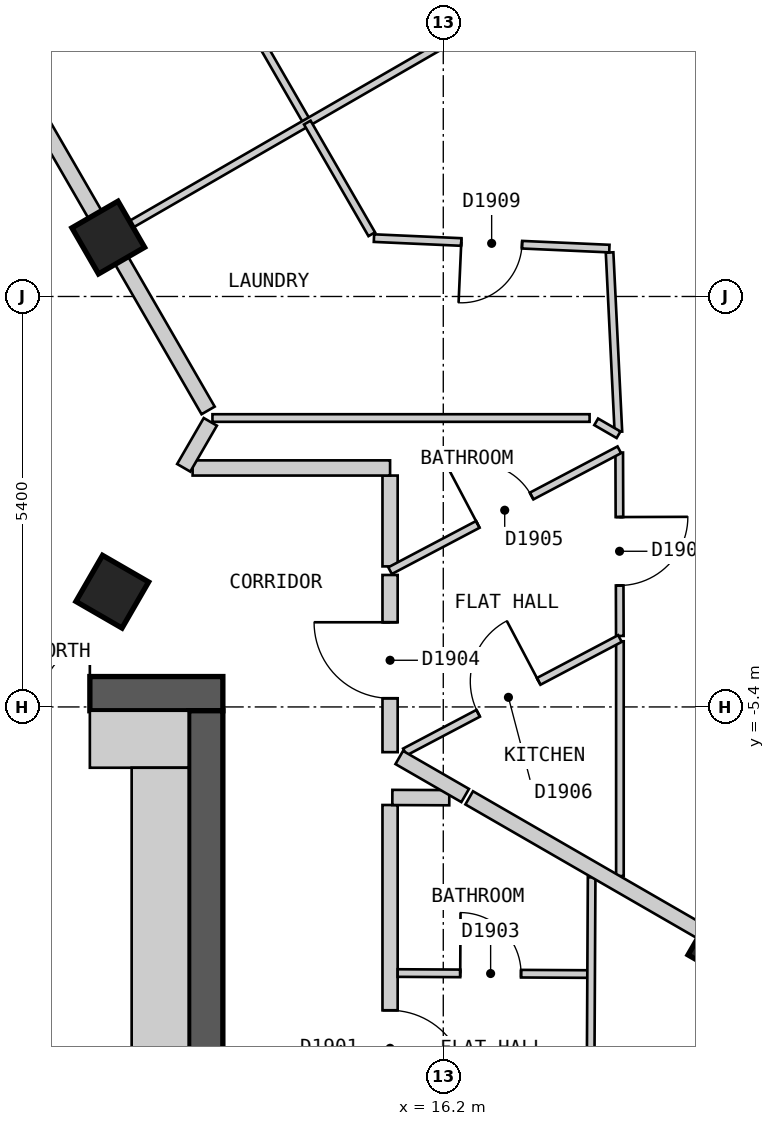
"""IFC4 building model, lengths in metres.
Left out: names, types, materials, properties, quantities, classifications, styles, units other than length and angle.
Written with IfcOpenShell. Run it as: python <this file> out.ifc"""

import sys

from ifc_helpers import new_model, si_unit, direction, frame, frame_2d, origin, origin_2d, place, context, subcontext, project, spatial, polyline, rectangle, outline, extrude, element, fill, save


model = new_model("IFC4")
c1 = context("Model", 3, precision=1e-05, world=origin(), true_north=direction((0.0, 1.0)))
c2 = subcontext(c1, "Body", "Model", "MODEL_VIEW")
j1 = project(units=[si_unit("LENGTHUNIT", "METRE"), si_unit("PLANEANGLEUNIT", "RADIAN")], contexts=[c1])
p1 = place(None, origin())
s1 = spatial("IfcSite", under=j1, at=p1, CompositionType="ELEMENT")
p2 = place(p1, origin())
s2 = spatial("IfcBuilding", under=s1, at=p2, CompositionType="ELEMENT")
p3 = place(p2, frame((0.0, 0.0, 220.8)))
s3 = spatial("IfcBuildingStorey", under=s2, at=p3, CompositionType="ELEMENT", Elevation=220.8)
for number, where, z_axis, x_axis in (
    (1, (19.899, -8.534, 0.0), (0.0, 0.0, 1.0), (0.5, 0.866, 0.0)),
    (2, (11.845, -3.884, 0.0), (0.0, 0.0, 1.0), (0.5, 0.866, 0.0)),
    (3, (11.792, 0.775, 0.0), (0.0, 0.0, 1.0), (-0.5, 0.866, 0.0)),
):
    element("IfcColumn", number, at=place(p3, frame(where, z_axis=z_axis, x_axis=x_axis)), inside=s3, PredefinedType="COLUMN", context=c2, shape_type="SweptSolid", body=[
        extrude(rectangle(XDim=0.7, YDim=0.7, at=origin_2d()), origin(), (0.0, 0.0, 1.0), 3.0),
    ])
p4 = place(p3, frame((-13.3, -5.225, 0.0), z_axis=(0.0, 0.0, 1.0), x_axis=(1.0, 0.0, 0.0)))
e4 = element("IfcWall", 4, at=p4, inside=s3, PredefinedType="SHEAR", context=c2, shape_type="SweptSolid", body=[
    extrude(rectangle(XDim=26.6, YDim=0.45, at=frame_2d((13.3, 0.0))), origin(), (0.0, 0.0, 1.0), 2.7),
])
p5 = place(p4, frame((23.65, 0.0, 0.0)))
e5 = element("IfcOpeningElement", 5, at=p5, cuts=e4, PredefinedType="OPENING", context=c2, shape_type="SweptSolid", body=[
    extrude(rectangle(XDim=1.2, YDim=2.1, at=frame_2d((0.6, 1.05))), frame((0.0, 0.235, 0.0), z_axis=(0.0, -1.0, 0.0), x_axis=(1.0, 0.0, 0.0)), (0.0, 0.0, 1.0), 0.47),
])
p6 = place(p3, frame((13.075, -18.55, 0.0), z_axis=(0.0, 0.0, 1.0), x_axis=(0.0, 1.0, 0.0)))
e6 = element("IfcWall", 6, at=p6, inside=s3, PredefinedType="SHEAR", context=c2, shape_type="SweptSolid", body=[
    extrude(rectangle(XDim=13.1, YDim=0.45, at=frame_2d((6.55, 0.0))), origin(), (0.0, 0.0, 1.0), 2.7),
])
p7 = place(p3, frame((15.285, -18.425, 0.0), z_axis=(0.0, 0.0, 1.0), x_axis=(0.500012653391, 0.866018098222, 0.0)))
e7 = element("IfcWall", 7, at=p7, inside=s3, PredefinedType="SOLIDWALL", context=c2, shape_type="SweptSolid", body=[
    extrude(outline(polyline([(0.0, -0.15), (16.628, -0.15), (16.548, 0.15), (0.08, 0.15), (0.0, -0.15)])), origin(), (0.0, 0.0, 1.0), 2.7),
])
p8 = place(p7, frame((1.165, 0.0, 0.15)))
e8 = element("IfcOpeningElement", 8, at=p8, cuts=e7, PredefinedType="OPENING", context=c2, shape_type="SweptSolid", body=[
    extrude(rectangle(XDim=1.5, YDim=2.1, at=frame_2d((0.75, 1.05))), frame((0.0, 0.16, 0.0), z_axis=(0.0, -1.0, 0.0), x_axis=(1.0, 0.0, 0.0)), (0.0, 0.0, 1.0), 0.32),
])
p9 = place(p7, frame((3.724, 0.0, 0.15)))
e9 = element("IfcOpeningElement", 9, at=p9, cuts=e7, PredefinedType="OPENING", context=c2, shape_type="SweptSolid", body=[
    extrude(rectangle(XDim=1.5, YDim=2.1, at=frame_2d((0.75, 1.05))), frame((0.0, 0.16, 0.0), z_axis=(0.0, -1.0, 0.0), x_axis=(1.0, 0.0, 0.0)), (0.0, 0.0, 1.0), 0.32),
])
p10 = place(p7, frame((6.283, 0.0, 0.15)))
e10 = element("IfcOpeningElement", 10, at=p10, cuts=e7, PredefinedType="OPENING", context=c2, shape_type="SweptSolid", body=[
    extrude(rectangle(XDim=1.5, YDim=2.1, at=frame_2d((0.75, 1.05))), frame((0.0, 0.16, 0.0), z_axis=(0.0, -1.0, 0.0), x_axis=(1.0, 0.0, 0.0)), (0.0, 0.0, 1.0), 0.32),
])
p11 = place(p7, frame((8.843, 0.0, 0.15)))
e11 = element("IfcOpeningElement", 11, at=p11, cuts=e7, PredefinedType="OPENING", context=c2, shape_type="SweptSolid", body=[
    extrude(rectangle(XDim=1.5, YDim=2.1, at=frame_2d((0.75, 1.05))), frame((0.0, 0.16, 0.0), z_axis=(0.0, -1.0, 0.0), x_axis=(1.0, 0.0, 0.0)), (0.0, 0.0, 1.0), 0.32),
])
p12 = place(p7, frame((11.402, 0.0, 0.15)))
e12 = element("IfcOpeningElement", 12, at=p12, cuts=e7, PredefinedType="OPENING", context=c2, shape_type="SweptSolid", body=[
    extrude(rectangle(XDim=1.5, YDim=2.1, at=frame_2d((0.75, 1.05))), frame((0.0, 0.16, 0.0), z_axis=(0.0, -1.0, 0.0), x_axis=(1.0, 0.0, 0.0)), (0.0, 0.0, 1.0), 0.32),
])
p13 = place(p7, frame((13.962, 0.0, 0.15)))
e13 = element("IfcOpeningElement", 13, at=p13, cuts=e7, PredefinedType="OPENING", context=c2, shape_type="SweptSolid", body=[
    extrude(rectangle(XDim=1.5, YDim=2.1, at=frame_2d((0.75, 1.05))), frame((0.0, 0.16, 0.0), z_axis=(0.0, -1.0, 0.0), x_axis=(1.0, 0.0, 0.0)), (0.0, 0.0, 1.0), 0.32),
])
p14 = place(p3, frame((23.599, 0.825, 0.0), z_axis=(0.0, 0.0, 1.0), x_axis=(-0.500003656944, 0.866023292436, 0.0)))
e14 = element("IfcWall", 14, at=p14, inside=s3, PredefinedType="SOLIDWALL", context=c2, shape_type="SweptSolid", body=[
    extrude(outline(polyline([(0.0, -0.15), (22.17, -0.15), (22.09, 0.15), (0.08, 0.15), (0.0, -0.15)])), origin(), (0.0, 0.0, 1.0), 2.7),
])
p15 = place(p14, frame((1.191, 0.0, 0.15)))
e15 = element("IfcOpeningElement", 15, at=p15, cuts=e14, PredefinedType="OPENING", context=c2, shape_type="SweptSolid", body=[
    extrude(rectangle(XDim=1.5, YDim=2.1, at=frame_2d((0.75, 1.05))), frame((0.0, 0.16, 0.0), z_axis=(0.0, -1.0, 0.0), x_axis=(1.0, 0.0, 0.0)), (0.0, 0.0, 1.0), 0.32),
])
p16 = place(p14, frame((3.804, 0.0, 0.15)))
e16 = element("IfcOpeningElement", 16, at=p16, cuts=e14, PredefinedType="OPENING", context=c2, shape_type="SweptSolid", body=[
    extrude(rectangle(XDim=1.5, YDim=2.1, at=frame_2d((0.75, 1.05))), frame((0.0, 0.16, 0.0), z_axis=(0.0, -1.0, 0.0), x_axis=(1.0, 0.0, 0.0)), (0.0, 0.0, 1.0), 0.32),
])
p17 = place(p14, frame((6.417, 0.0, 0.15)))
e17 = element("IfcOpeningElement", 17, at=p17, cuts=e14, PredefinedType="OPENING", context=c2, shape_type="SweptSolid", body=[
    extrude(rectangle(XDim=1.5, YDim=2.1, at=frame_2d((0.75, 1.05))), frame((0.0, 0.16, 0.0), z_axis=(0.0, -1.0, 0.0), x_axis=(1.0, 0.0, 0.0)), (0.0, 0.0, 1.0), 0.32),
])
p18 = place(p14, frame((9.029, 0.0, 0.15)))
e18 = element("IfcOpeningElement", 18, at=p18, cuts=e14, PredefinedType="OPENING", context=c2, shape_type="SweptSolid", body=[
    extrude(rectangle(XDim=1.5, YDim=2.1, at=frame_2d((0.75, 1.05))), frame((0.0, 0.16, 0.0), z_axis=(0.0, -1.0, 0.0), x_axis=(1.0, 0.0, 0.0)), (0.0, 0.0, 1.0), 0.32),
])
p19 = place(p14, frame((11.641, 0.0, 0.15)))
e19 = element("IfcOpeningElement", 19, at=p19, cuts=e14, PredefinedType="OPENING", context=c2, shape_type="SweptSolid", body=[
    extrude(rectangle(XDim=1.5, YDim=2.1, at=frame_2d((0.75, 1.05))), frame((0.0, 0.16, 0.0), z_axis=(0.0, -1.0, 0.0), x_axis=(1.0, 0.0, 0.0)), (0.0, 0.0, 1.0), 0.32),
])
p20 = place(p14, frame((14.254, 0.0, 0.15)))
e20 = element("IfcOpeningElement", 20, at=p20, cuts=e14, PredefinedType="OPENING", context=c2, shape_type="SweptSolid", body=[
    extrude(rectangle(XDim=1.5, YDim=2.1, at=frame_2d((0.75, 1.05))), frame((0.0, 0.16, 0.0), z_axis=(0.0, -1.0, 0.0), x_axis=(1.0, 0.0, 0.0)), (0.0, 0.0, 1.0), 0.32),
])
p21 = place(p14, frame((16.866, 0.0, 0.15)))
e21 = element("IfcOpeningElement", 21, at=p21, cuts=e14, PredefinedType="OPENING", context=c2, shape_type="SweptSolid", body=[
    extrude(rectangle(XDim=1.5, YDim=2.1, at=frame_2d((0.75, 1.05))), frame((0.0, 0.16, 0.0), z_axis=(0.0, -1.0, 0.0), x_axis=(1.0, 0.0, 0.0)), (0.0, 0.0, 1.0), 0.32),
])
p22 = place(p14, frame((19.479, 0.0, 0.15)))
e22 = element("IfcOpeningElement", 22, at=p22, cuts=e14, PredefinedType="OPENING", context=c2, shape_type="SweptSolid", body=[
    extrude(rectangle(XDim=1.5, YDim=2.1, at=frame_2d((0.75, 1.05))), frame((0.0, 0.16, 0.0), z_axis=(0.0, -1.0, 0.0), x_axis=(1.0, 0.0, 0.0)), (0.0, 0.0, 1.0), 0.32),
])
p23 = place(p3, frame((9.238, 5.2, 0.0), z_axis=(0.0, 0.0, 1.0), x_axis=(0.500025705601, -0.86601056214, 0.0)))
e23 = element("IfcWall", 23, at=p23, inside=s3, PredefinedType="PARTITIONING", context=c2, shape_type="SweptSolid", body=[
    extrude(rectangle(XDim=7.735, YDim=0.2, at=frame_2d((3.868, 0.0))), origin(), (0.0, 0.0, 1.0), 2.7),
])
p24 = place(p3, frame((15.5, -2.356, 0.0), z_axis=(0.0, 0.0, 1.0), x_axis=(0.0, -1.0, 0.0)))
e24 = element("IfcWall", 24, at=p24, inside=s3, PredefinedType="PARTITIONING", context=c2, shape_type="SweptSolid", body=[
    extrude(rectangle(XDim=1.195, YDim=0.2, at=frame_2d((0.598, 0.0))), origin(), (0.0, 0.0, 1.0), 2.7),
])
p25 = place(p3, frame((12.902, -2.256, 0.0), z_axis=(0.0, 0.0, 1.0), x_axis=(1.0, 0.0, 0.0)))
e25 = element("IfcWall", 25, at=p25, inside=s3, PredefinedType="PARTITIONING", context=c2, shape_type="SweptSolid", body=[
    extrude(rectangle(XDim=2.598, YDim=0.2, at=frame_2d((1.299, 0.0))), origin(), (0.0, 0.0, 1.0), 2.7),
])
p26 = place(p3, frame((12.785, -2.254, 0.0), z_axis=(0.0, 0.0, 1.0), x_axis=(0.500871040665, 0.865521923826, 0.0)))
e26 = element("IfcWall", 26, at=p26, inside=s3, PredefinedType="PARTITIONING", context=c2, shape_type="SweptSolid", body=[
    extrude(rectangle(XDim=0.699, YDim=0.2, at=frame_2d((0.35, 0.0))), origin(), (0.0, 0.0, 1.0), 2.7),
])
p27 = place(p3, frame((15.5, -17.752, 0.0), z_axis=(0.0, 0.0, 1.0), x_axis=(0.0, 1.0, 0.0)))
e27 = element("IfcWall", 27, at=p27, inside=s3, PredefinedType="PARTITIONING", context=c2, shape_type="SweptSolid", body=[
    extrude(rectangle(XDim=11.062, YDim=0.2, at=frame_2d((5.531, 0.0))), origin(), (0.0, 0.0, 1.0), 2.7),
])
p28 = place(p27, frame((7.361, 0.0, 0.0)))
e28 = element("IfcOpeningElement", 28, at=p28, cuts=e27, PredefinedType="OPENING", context=c2, shape_type="SweptSolid", body=[
    extrude(rectangle(XDim=1.0, YDim=2.1, at=frame_2d((0.5, 1.05))), frame((0.0, 0.11, 0.0), z_axis=(0.0, -1.0, 0.0), x_axis=(1.0, 0.0, 0.0)), (0.0, 0.0, 1.0), 0.22),
])
p29 = place(p3, frame((15.5, -5.995, 0.0), z_axis=(0.0, 0.0, 1.0), x_axis=(0.0, 1.0, 0.0)))
e29 = element("IfcWall", 29, at=p29, inside=s3, PredefinedType="PARTITIONING", context=c2, shape_type="SweptSolid", body=[
    extrude(rectangle(XDim=2.331, YDim=0.2, at=frame_2d((1.166, 0.0))), origin(), (0.0, 0.0, 1.0), 2.7),
])
p30 = place(p29, frame((0.709, 0.0, 0.0)))
e30 = element("IfcOpeningElement", 30, at=p30, cuts=e29, PredefinedType="OPENING", context=c2, shape_type="SweptSolid", body=[
    extrude(rectangle(XDim=1.0, YDim=2.1, at=frame_2d((0.5, 1.05))), frame((0.0, 0.11, 0.0), z_axis=(0.0, -1.0, 0.0), x_axis=(1.0, 0.0, 0.0)), (0.0, 0.0, 1.0), 0.22),
])
p31 = place(p3, frame((15.6, -8.901, 0.0), z_axis=(0.0, 0.0, 1.0), x_axis=(0.999986038514, -0.005284200615, 0.0)))
e31 = element("IfcWall", 31, at=p31, inside=s3, PredefinedType="PARTITIONING", context=c2, shape_type="SweptSolid", body=[
    extrude(rectangle(XDim=2.495, YDim=0.1, at=frame_2d((1.248, 0.0))), origin(), (0.0, 0.0, 1.0), 2.7),
])
p32 = place(p31, frame((0.823, 0.0, 0.0)))
e32 = element("IfcOpeningElement", 32, at=p32, cuts=e31, PredefinedType="OPENING", context=c2, shape_type="SweptSolid", body=[
    extrude(rectangle(XDim=0.8, YDim=2.1, at=frame_2d((0.4, 1.05))), frame((0.0, 0.06, 0.0), z_axis=(0.0, -1.0, 0.0), x_axis=(1.0, 0.0, 0.0)), (0.0, 0.0, 1.0), 0.12),
])
p33 = place(p3, frame((12.759, 5.15, 0.0), z_axis=(0.0, 0.0, 1.0), x_axis=(0.499905801698, -0.866079782369, 0.0)))
e33 = element("IfcWall", 33, at=p33, inside=s3, PredefinedType="PARTITIONING", context=c2, shape_type="SweptSolid", body=[
    extrude(rectangle(XDim=3.304, YDim=0.1, at=frame_2d((1.652, 0.0))), origin(), (0.0, 0.0, 1.0), 2.7),
])
p34 = place(p33, frame((1.223, 0.0, 0.0)))
e34 = element("IfcOpeningElement", 34, at=p34, cuts=e33, PredefinedType="OPENING", context=c2, shape_type="SweptSolid", body=[
    extrude(rectangle(XDim=0.8, YDim=2.1, at=frame_2d((0.4, 1.05))), frame((0.0, 0.06, 0.0), z_axis=(0.0, -1.0, 0.0), x_axis=(1.0, 0.0, 0.0)), (0.0, 0.0, 1.0), 0.12),
])
p35 = place(p3, frame((18.388, 0.579, 0.0), z_axis=(0.0, 0.0, 1.0), x_axis=(0.049097293833, -0.998794000652, 0.0)))
e35 = element("IfcWall", 35, at=p35, inside=s3, PredefinedType="PARTITIONING", context=c2, shape_type="SweptSolid", body=[
    extrude(rectangle(XDim=2.362, YDim=0.1, at=frame_2d((1.181, 0.0))), origin(), (0.0, 0.0, 1.0), 2.7),
])
p36 = place(p3, frame((18.515, -2.053, 0.0), z_axis=(0.0, 0.0, 1.0), x_axis=(0.003338710651, -0.99999442649, 0.0)))
e36 = element("IfcWall", 36, at=p36, inside=s3, PredefinedType="PARTITIONING", context=c2, shape_type="SweptSolid", body=[
    extrude(rectangle(XDim=2.413, YDim=0.1, at=frame_2d((1.207, 0.0))), origin(), (0.0, 0.0, 1.0), 2.7),
])
p37 = place(p36, frame((0.849, 0.0, 0.0)))
e37 = element("IfcOpeningElement", 37, at=p37, cuts=e36, PredefinedType="OPENING", context=c2, shape_type="SweptSolid", body=[
    extrude(rectangle(XDim=0.9, YDim=2.1, at=frame_2d((0.45, 1.05))), frame((0.0, 0.06, 0.0), z_axis=(0.0, -1.0, 0.0), x_axis=(1.0, 0.0, 0.0)), (0.0, 0.0, 1.0), 0.12),
])
p38 = place(p3, frame((15.288, 0.768, 0.0), z_axis=(0.0, 0.0, 1.0), x_axis=(0.999006028269, -0.044575278833, 0.0)))
e38 = element("IfcWall", 38, at=p38, inside=s3, PredefinedType="PARTITIONING", context=c2, shape_type="SweptSolid", body=[
    extrude(rectangle(XDim=3.1, YDim=0.1, at=frame_2d((1.55, 0.0))), origin(), (0.0, 0.0, 1.0), 2.7),
])
p39 = place(p38, frame((1.15, 0.0, 0.0)))
e39 = element("IfcOpeningElement", 39, at=p39, cuts=e38, PredefinedType="OPENING", context=c2, shape_type="SweptSolid", body=[
    extrude(rectangle(XDim=0.8, YDim=2.1, at=frame_2d((0.4, 1.05))), frame((0.0, 0.06, 0.0), z_axis=(0.0, -1.0, 0.0), x_axis=(1.0, 0.0, 0.0)), (0.0, 0.0, 1.0), 0.12),
])
p40 = place(p3, frame((18.212, -1.649, 0.0), z_axis=(0.0, 0.0, 1.0), x_axis=(0.865622947871, -0.500696427109, 0.0)))
e40 = element("IfcWall", 40, at=p40, inside=s3, PredefinedType="PARTITIONING", context=c2, shape_type="SweptSolid", body=[
    extrude(rectangle(XDim=0.34, YDim=0.1, at=frame_2d((0.17, 0.0))), origin(), (0.0, 0.0, 1.0), 2.7),
])
p41 = place(p3, frame((13.163, -1.599, 0.0), z_axis=(0.0, 0.0, 1.0), x_axis=(1.0, 0.0, 0.0)))
e41 = element("IfcWall", 41, at=p41, inside=s3, PredefinedType="PARTITIONING", context=c2, shape_type="SweptSolid", body=[
    extrude(rectangle(XDim=4.962, YDim=0.1, at=frame_2d((2.481, 0.0))), origin(), (0.0, 0.0, 1.0), 2.7),
])
p42 = place(p3, frame((18.135, -10.893, 0.0), z_axis=(0.0, 0.0, 1.0), x_axis=(0.005255182688, 0.999986191432, 0.0)))
e42 = element("IfcWall", 42, at=p42, inside=s3, PredefinedType="PARTITIONING", context=c2, shape_type="SweptSolid", body=[
    extrude(rectangle(XDim=3.252, YDim=0.1, at=frame_2d((1.626, 0.0))), origin(), (0.0, 0.0, 1.0), 2.7),
])
p43 = place(p3, frame((18.524, -7.625, 0.0), z_axis=(0.0, 0.0, 1.0), x_axis=(0.0, 1.0, 0.0)))
e43 = element("IfcWall", 43, at=p43, inside=s3, PredefinedType="PARTITIONING", context=c2, shape_type="SweptSolid", body=[
    extrude(rectangle(XDim=3.089, YDim=0.1, at=frame_2d((1.544, 0.0))), origin(), (0.0, 0.0, 1.0), 2.7),
])
p44 = place(p3, frame((15.5, -3.607, 0.0), z_axis=(0.0, 0.0, 1.0), x_axis=(0.884626030835, 0.466301174745, 0.0)))
e44 = element("IfcWall", 44, at=p44, inside=s3, PredefinedType="PARTITIONING", context=c2, shape_type="SweptSolid", body=[
    extrude(rectangle(XDim=3.409, YDim=0.1, at=frame_2d((1.705, 0.0))), origin(), (0.0, 0.0, 1.0), 2.7),
])
p45 = place(p44, frame((1.305, 0.0, 0.0)))
e45 = element("IfcOpeningElement", 45, at=p45, cuts=e44, PredefinedType="OPENING", context=c2, shape_type="SweptSolid", body=[
    extrude(rectangle(XDim=0.8, YDim=2.1, at=frame_2d((0.4, 1.05))), frame((0.0, 0.06, 0.0), z_axis=(0.0, -1.0, 0.0), x_axis=(1.0, 0.0, 0.0)), (0.0, 0.0, 1.0), 0.12),
])
p46 = place(p3, frame((15.695, -5.992, 0.0), z_axis=(0.0, 0.0, 1.0), x_axis=(0.884522140369, 0.466498213498, 0.0)))
e46 = element("IfcWall", 46, at=p46, inside=s3, PredefinedType="PARTITIONING", context=c2, shape_type="SweptSolid", body=[
    extrude(rectangle(XDim=3.198, YDim=0.1, at=frame_2d((1.599, 0.0))), origin(), (0.0, 0.0, 1.0), 2.7),
])
p47 = place(p46, frame((1.09, 0.0, 0.0)))
e47 = element("IfcOpeningElement", 47, at=p47, cuts=e46, PredefinedType="OPENING", context=c2, shape_type="SweptSolid", body=[
    extrude(rectangle(XDim=0.9, YDim=2.1, at=frame_2d((0.45, 1.05))), frame((0.0, 0.06, 0.0), z_axis=(0.0, -1.0, 0.0), x_axis=(1.0, 0.0, 0.0)), (0.0, 0.0, 1.0), 0.12),
])
p48 = place(p3, frame((11.879, 0.826, 0.0), z_axis=(0.0, 0.0, 1.0), x_axis=(0.866065245018, 0.499930986609, 0.0)))
e48 = element("IfcWall", 48, at=p48, inside=s3, PredefinedType="PARTITIONING", context=c2, shape_type="SweptSolid", body=[
    extrude(rectangle(XDim=10.0, YDim=0.1, at=frame_2d((5.0, 0.0))), origin(), (0.0, 0.0, 1.0), 2.7),
])
p49 = place(p48, frame((6.012, 0.0, 0.0)))
e49 = element("IfcOpeningElement", 49, at=p49, cuts=e48, PredefinedType="OPENING", context=c2, shape_type="SweptSolid", body=[
    extrude(rectangle(XDim=0.9, YDim=2.1, at=frame_2d((0.45, 1.05))), frame((0.0, 0.06, 0.0), z_axis=(0.0, -1.0, 0.0), x_axis=(1.0, 0.0, 0.0)), (0.0, 0.0, 1.0), 0.12),
])
p50 = place(p3, frame((15.53, -6.591, 0.0), z_axis=(0.0, 0.0, 1.0), x_axis=(0.999992350786, -0.003911312976, 0.0)))
e50 = element("IfcWall", 50, at=p50, inside=s3, PredefinedType="PARTITIONING", context=c2, shape_type="SweptSolid", body=[
    extrude(rectangle(XDim=0.749, YDim=0.2, at=frame_2d((0.375, 0.0))), origin(), (0.0, 0.0, 1.0), 2.7),
])
p51 = place(p3, frame((15.621, -6.065, 0.0), z_axis=(0.0, 0.0, 1.0), x_axis=(0.866254619292, -0.49960277677, 0.0)))
e51 = element("IfcWall", 51, at=p51, inside=s3, PredefinedType="PARTITIONING", context=c2, shape_type="SweptSolid", body=[
    extrude(rectangle(XDim=1.001, YDim=0.2, at=frame_2d((0.5, 0.0))), origin(), (0.0, 0.0, 1.0), 2.7),
])
p52 = place(p3, frame((16.541, -6.596, 0.0), z_axis=(0.0, 0.0, 1.0), x_axis=(0.866040404911, -0.499974016386, 0.0)))
e52 = element("IfcWall", 52, at=p52, inside=s3, PredefinedType="PARTITIONING", context=c2, shape_type="SweptSolid", body=[
    extrude(rectangle(XDim=4.677, YDim=0.2, at=frame_2d((2.338, 0.0))), origin(), (0.0, 0.0, 1.0), 2.7),
])
p53 = place(p3, frame((14.411, 2.288, 0.0), z_axis=(0.0, 0.0, 1.0), x_axis=(0.500009005995, -0.866020204108, 0.0)))
e53 = element("IfcWall", 53, at=p53, inside=s3, PredefinedType="PARTITIONING", context=c2, shape_type="SweptSolid", body=[
    extrude(rectangle(XDim=1.696, YDim=0.1, at=frame_2d((0.848, 0.0))), origin(), (0.0, 0.0, 1.0), 2.7),
])
p54 = place(p3, frame((11.55, -5.825, 0.0), z_axis=(0.0, 0.0, 1.0), x_axis=(1.0, 0.0, 0.0)))
e54 = element("IfcWall", 54, at=p54, inside=s3, PredefinedType="PARTITIONING", context=c2, shape_type="SweptSolid", body=[
    extrude(rectangle(XDim=1.3, YDim=0.75, at=frame_2d((0.65, 0.0))), origin(), (0.0, 0.0, 1.0), 2.7),
])
p55 = place(p3, frame((12.475, -14.45, 0.0), z_axis=(0.0, 0.0, 1.0), x_axis=(0.0, 1.0, 0.0)))
e55 = element("IfcWall", 55, at=p55, inside=s3, PredefinedType="PARTITIONING", context=c2, shape_type="SweptSolid", body=[
    extrude(rectangle(XDim=8.25, YDim=0.75, at=frame_2d((4.125, 0.0))), origin(), (0.0, 0.0, 1.0), 2.7),
])
p56 = place(p28, origin())
e56 = element("IfcDoor", 56, at=p56, inside=s3, OperationType="SINGLE_SWING_LEFT", PredefinedType="DOOR", context=c2, shape_type="SweptSolid", body=[
    extrude(rectangle(XDim=1.0, YDim=2.1, at=frame_2d((0.5, 1.05))), frame((0.0, 0.025, 0.0), z_axis=(0.0, -1.0, 0.0), x_axis=(1.0, 0.0, 0.0)), (0.0, 0.0, 1.0), 0.05),
])
fill(e28, e56)
p57 = place(p32, origin())
e57 = element("IfcDoor", 57, at=p57, inside=s3, OperationType="SINGLE_SWING_LEFT", PredefinedType="DOOR", context=c2, shape_type="SweptSolid", body=[
    extrude(rectangle(XDim=0.8, YDim=2.1, at=frame_2d((0.4, 1.05))), frame((0.0, 0.025, 0.0), z_axis=(0.0, -1.0, 0.0), x_axis=(1.0, 0.0, 0.0)), (0.0, 0.0, 1.0), 0.05),
])
fill(e32, e57)
p58 = place(p30, origin())
e58 = element("IfcDoor", 58, at=p58, inside=s3, OperationType="SINGLE_SWING_RIGHT", PredefinedType="DOOR", context=c2, shape_type="SweptSolid", body=[
    extrude(rectangle(XDim=1.0, YDim=2.1, at=frame_2d((0.5, 1.05))), frame((0.0, 0.025, 0.0), z_axis=(0.0, -1.0, 0.0), x_axis=(1.0, 0.0, 0.0)), (0.0, 0.0, 1.0), 0.05),
])
fill(e30, e58)
p59 = place(p45, origin())
e59 = element("IfcDoor", 59, at=p59, inside=s3, OperationType="SINGLE_SWING_LEFT", PredefinedType="DOOR", context=c2, shape_type="SweptSolid", body=[
    extrude(rectangle(XDim=0.8, YDim=2.1, at=frame_2d((0.4, 1.05))), frame((0.0, 0.025, 0.0), z_axis=(0.0, -1.0, 0.0), x_axis=(1.0, 0.0, 0.0)), (0.0, 0.0, 1.0), 0.05),
])
fill(e45, e59)
p60 = place(p47, origin())
e60 = element("IfcDoor", 60, at=p60, inside=s3, OperationType="SINGLE_SWING_RIGHT", PredefinedType="DOOR", context=c2, shape_type="SweptSolid", body=[
    extrude(rectangle(XDim=0.9, YDim=2.1, at=frame_2d((0.45, 1.05))), frame((0.0, 0.025, 0.0), z_axis=(0.0, -1.0, 0.0), x_axis=(1.0, 0.0, 0.0)), (0.0, 0.0, 1.0), 0.05),
])
fill(e47, e60)
p61 = place(p37, origin())
e61 = element("IfcDoor", 61, at=p61, inside=s3, OperationType="SINGLE_SWING_LEFT", PredefinedType="DOOR", context=c2, shape_type="SweptSolid", body=[
    extrude(rectangle(XDim=0.9, YDim=2.1, at=frame_2d((0.45, 1.05))), frame((0.0, 0.025, 0.0), z_axis=(0.0, -1.0, 0.0), x_axis=(1.0, 0.0, 0.0)), (0.0, 0.0, 1.0), 0.05),
])
fill(e37, e61)
p62 = place(p39, origin())
e62 = element("IfcDoor", 62, at=p62, inside=s3, OperationType="SINGLE_SWING_LEFT", PredefinedType="DOOR", context=c2, shape_type="SweptSolid", body=[
    extrude(rectangle(XDim=0.8, YDim=2.1, at=frame_2d((0.4, 1.05))), frame((0.0, 0.025, 0.0), z_axis=(0.0, -1.0, 0.0), x_axis=(1.0, 0.0, 0.0)), (0.0, 0.0, 1.0), 0.05),
])
fill(e39, e62)
p63 = place(p5, origin())
e63 = element("IfcDoor", 63, at=p63, inside=s3, OperationType="DOUBLE_DOOR_SINGLE_SWING", PredefinedType="DOOR", context=c2, shape_type="SweptSolid", body=[
    extrude(rectangle(XDim=1.2, YDim=2.1, at=frame_2d((0.6, 1.05))), frame((0.0, 0.025, 0.0), z_axis=(0.0, -1.0, 0.0), x_axis=(1.0, 0.0, 0.0)), (0.0, 0.0, 1.0), 0.05),
])
fill(e5, e63)
save(model, sys.argv[1])
